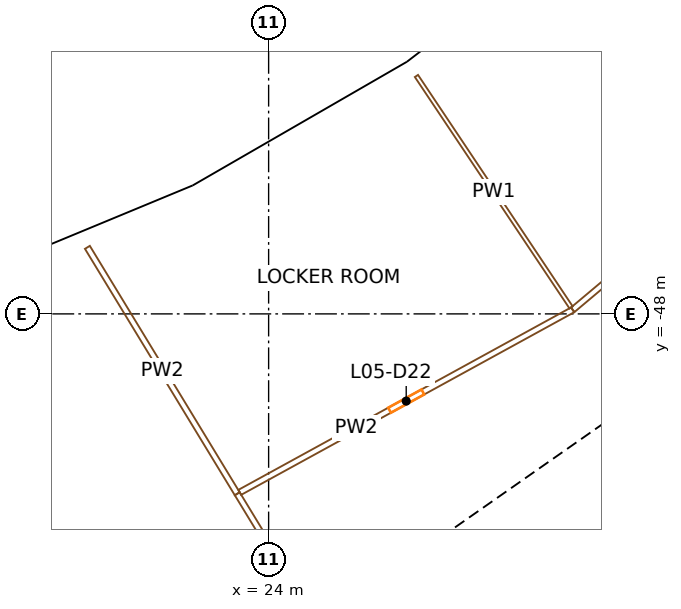
"""IFC4 building model, lengths in metres.
Left out: names, types, materials, properties, quantities, classifications, styles, units other than length and angle.
Written with IfcOpenShell. Run it as: python <this file> out.ifc"""

import sys

from ifc_helpers import new_model, si_unit, direction, frame, frame_2d, origin, origin_2d, place, context, subcontext, project, spatial, rectangle, extrude, element, fill, save


model = new_model("IFC4")
c1 = context("Model", 3, precision=1e-05, world=origin(), true_north=direction((0.0, 1.0)))
c2 = subcontext(c1, "Body", "Model", "MODEL_VIEW")
j1 = project(units=[si_unit("LENGTHUNIT", "METRE"), si_unit("PLANEANGLEUNIT", "RADIAN")], contexts=[c1])
p1 = place(None, origin())
s1 = spatial("IfcSite", under=j1, at=p1, CompositionType="ELEMENT")
p2 = place(p1, origin())
s2 = spatial("IfcBuilding", under=s1, at=p2, CompositionType="ELEMENT")
p3 = place(p2, frame((0.0, 0.0, 36.0)))
s3 = spatial("IfcBuildingStorey", under=s2, at=p3, CompositionType="ELEMENT", Elevation=36.0)
p4 = place(p3, frame((22.446, -45.516, 0.0), z_axis=(0.0, 0.0, 1.0), x_axis=(0.896872741533, 0.442288690219, 0.0)))
e1 = element("IfcColumn", 1, at=p4, inside=s3, PredefinedType="COLUMN", context=c2, shape_type="SweptSolid", body=[
    extrude(rectangle(XDim=1.1, YDim=1.3, at=origin_2d()), origin(), (0.0, 0.0, 1.0), 4.5),
])
p5 = place(p3, frame((25.763, -52.243, 0.0), z_axis=(0.0, 0.0, 1.0), x_axis=(0.896872741533, 0.442288690219, 0.0)))
e2 = element("IfcColumn", 2, at=p5, inside=s3, PredefinedType="COLUMN", context=c2, shape_type="SweptSolid", body=[
    extrude(rectangle(XDim=1.4, YDim=1.8, at=origin_2d()), origin(), (0.0, 0.0, 1.0), 4.5),
])
p6 = place(p3, frame((28.195, -42.197, 0.0), z_axis=(0.0, 0.0, 1.0), x_axis=(0.831469612303, 0.55557023302, 0.0)))
e3 = element("IfcColumn", 3, at=p6, inside=s3, PredefinedType="COLUMN", context=c2, shape_type="SweptSolid", body=[
    extrude(rectangle(XDim=1.1, YDim=1.3, at=origin_2d()), origin(), (0.0, 0.0, 1.0), 4.5),
])
p7 = place(p3, frame((32.362, -48.433, 0.0), z_axis=(0.0, 0.0, 1.0), x_axis=(0.831469612303, 0.55557023302, 0.0)))
e4 = element("IfcColumn", 4, at=p7, inside=s3, PredefinedType="COLUMN", context=c2, shape_type="SweptSolid", body=[
    extrude(rectangle(XDim=1.4, YDim=1.8, at=origin_2d()), origin(), (0.0, 0.0, 1.0), 4.5),
])
p8 = place(p3, frame((28.854, -54.324, 0.0), z_axis=(0.0, 0.0, 1.0), x_axis=(0.819145767589, 0.573585400304, 0.0)))
e5 = element("IfcWall", 5, at=p8, inside=s3, PredefinedType="SHEAR", context=c2, shape_type="SweptSolid", body=[
    extrude(rectangle(XDim=15.045, YDim=0.9, at=frame_2d((7.523, 0.0))), origin(), (0.0, 0.0, 1.0), 4.2),
])
p9 = place(p8, frame((1.05, 0.0, 0.0)))
e6 = element("IfcOpeningElement", 6, at=p9, cuts=e5, PredefinedType="OPENING", context=c2, shape_type="SweptSolid", body=[
    extrude(rectangle(XDim=0.9, YDim=2.1, at=frame_2d((0.45, 1.05))), frame((0.0, 0.46, 0.0), z_axis=(0.0, -1.0, 0.0), x_axis=(1.0, 0.0, 0.0)), (0.0, 0.0, 1.0), 0.92),
])
p10 = place(p8, frame((3.775, 0.0, 0.0)))
e7 = element("IfcOpeningElement", 7, at=p10, cuts=e5, PredefinedType="OPENING", context=c2, shape_type="SweptSolid", body=[
    extrude(rectangle(XDim=1.0, YDim=2.1, at=frame_2d((0.5, 1.05))), frame((0.0, 0.46, 0.0), z_axis=(0.0, -1.0, 0.0), x_axis=(1.0, 0.0, 0.0)), (0.0, 0.0, 1.0), 0.92),
])
p11 = place(p8, frame((6.275, 0.0, 0.0)))
e8 = element("IfcOpeningElement", 8, at=p11, cuts=e5, PredefinedType="OPENING", context=c2, shape_type="SweptSolid", body=[
    extrude(rectangle(XDim=1.0, YDim=2.1, at=frame_2d((0.5, 1.05))), frame((0.0, 0.46, 0.0), z_axis=(0.0, -1.0, 0.0), x_axis=(1.0, 0.0, 0.0)), (0.0, 0.0, 1.0), 0.92),
])
p12 = place(p8, frame((13.495, 0.0, 0.0)))
e9 = element("IfcOpeningElement", 9, at=p12, cuts=e5, PredefinedType="OPENING", context=c2, shape_type="SweptSolid", body=[
    extrude(rectangle(XDim=1.1, YDim=2.1, at=frame_2d((0.55, 1.05))), frame((0.0, 0.46, 0.0), z_axis=(0.0, -1.0, 0.0), x_axis=(1.0, 0.0, 0.0)), (0.0, 0.0, 1.0), 0.92),
])
p13 = place(p3, frame((30.461, -56.618, 0.0), z_axis=(0.0, 0.0, 1.0), x_axis=(0.819142461705, 0.573590121456, 0.0)))
e10 = element("IfcWall", 10, at=p13, inside=s3, PredefinedType="SOLIDWALL", context=c2, shape_type="SweptSolid", body=[
    extrude(rectangle(XDim=7.95, YDim=0.3, at=frame_2d((3.975, 0.0))), origin(), (0.0, 0.0, 1.0), 4.2),
])
p14 = place(p3, frame((32.914, -54.717, 0.0), z_axis=(0.0, 0.0, 1.0), x_axis=(-0.573581496053, 0.819148501424, 0.0)))
e11 = element("IfcWall", 11, at=p14, inside=s3, PredefinedType="PARTITIONING", context=c2, shape_type="SweptSolid", body=[
    extrude(rectangle(XDim=2.2, YDim=0.15, at=frame_2d((1.1, 0.0))), origin(), (0.0, 0.0, 1.0), 4.2),
])
p15 = place(p3, frame((22.131, -44.81, 0.0), z_axis=(0.0, 0.0, 1.0), x_axis=(-0.923877459804, -0.382688436284, 0.0)))
e12 = element("IfcWall", 12, at=p15, inside=s3, PredefinedType="SOLIDWALL", context=c2, shape_type="SweptSolid", body=[
    extrude(rectangle(XDim=6.597, YDim=0.45, at=frame_2d((3.299, 0.0))), origin(), (0.0, 0.0, 1.0), 3.2),
])
p16 = place(p15, frame((3.749, 0.0, 0.9)))
e13 = element("IfcOpeningElement", 13, at=p16, cuts=e12, PredefinedType="OPENING", context=c2, shape_type="SweptSolid", body=[
    extrude(rectangle(XDim=1.2, YDim=2.15, at=frame_2d((0.6, 1.075))), frame((0.0, 0.235, 0.0), z_axis=(0.0, -1.0, 0.0), x_axis=(1.0, 0.0, 0.0)), (0.0, 0.0, 1.0), 0.47),
])
p17 = place(p15, frame((1.648, 0.0, 0.9)))
e14 = element("IfcOpeningElement", 14, at=p17, cuts=e12, PredefinedType="OPENING", context=c2, shape_type="SweptSolid", body=[
    extrude(rectangle(XDim=1.2, YDim=2.15, at=frame_2d((0.6, 1.075))), frame((0.0, 0.235, 0.0), z_axis=(0.0, -1.0, 0.0), x_axis=(1.0, 0.0, 0.0)), (0.0, 0.0, 1.0), 0.47),
])
p18 = place(p3, frame((27.714, -41.583, 0.0), z_axis=(0.0, 0.0, 1.0), x_axis=(-0.866022817921, -0.50000447882, 0.0)))
e15 = element("IfcWall", 15, at=p18, inside=s3, PredefinedType="SOLIDWALL", context=c2, shape_type="SweptSolid", body=[
    extrude(rectangle(XDim=6.419, YDim=0.45, at=frame_2d((3.21, 0.0))), origin(), (0.0, 0.0, 1.0), 3.2),
])
p19 = place(p18, frame((3.66, 0.0, 0.9)))
e16 = element("IfcOpeningElement", 16, at=p19, cuts=e15, PredefinedType="OPENING", context=c2, shape_type="SweptSolid", body=[
    extrude(rectangle(XDim=1.2, YDim=2.15, at=frame_2d((0.6, 1.075))), frame((0.0, 0.235, 0.0), z_axis=(0.0, -1.0, 0.0), x_axis=(1.0, 0.0, 0.0)), (0.0, 0.0, 1.0), 0.47),
])
p20 = place(p18, frame((1.56, 0.0, 0.9)))
e17 = element("IfcOpeningElement", 17, at=p20, cuts=e15, PredefinedType="OPENING", context=c2, shape_type="SweptSolid", body=[
    extrude(rectangle(XDim=1.2, YDim=2.15, at=frame_2d((0.6, 1.075))), frame((0.0, 0.235, 0.0), z_axis=(0.0, -1.0, 0.0), x_axis=(1.0, 0.0, 0.0)), (0.0, 0.0, 1.0), 0.47),
])
p21 = place(p3, frame((32.975, -37.555, 0.0), z_axis=(0.0, 0.0, 1.0), x_axis=(-0.793338838284, -0.608780327927, 0.0)))
e18 = element("IfcWall", 18, at=p21, inside=s3, PredefinedType="SOLIDWALL", context=c2, shape_type="SweptSolid", body=[
    extrude(rectangle(XDim=6.597, YDim=0.45, at=frame_2d((3.298, 0.0))), origin(), (0.0, 0.0, 1.0), 3.2),
])
p22 = place(p21, frame((3.749, 0.0, 0.9)))
e19 = element("IfcOpeningElement", 19, at=p22, cuts=e18, PredefinedType="OPENING", context=c2, shape_type="SweptSolid", body=[
    extrude(rectangle(XDim=1.2, YDim=2.15, at=frame_2d((0.6, 1.075))), frame((0.0, 0.235, 0.0), z_axis=(0.0, -1.0, 0.0), x_axis=(1.0, 0.0, 0.0)), (0.0, 0.0, 1.0), 0.47),
])
p23 = place(p21, frame((1.648, 0.0, 0.9)))
e20 = element("IfcOpeningElement", 20, at=p23, cuts=e18, PredefinedType="OPENING", context=c2, shape_type="SweptSolid", body=[
    extrude(rectangle(XDim=1.2, YDim=2.15, at=frame_2d((0.6, 1.075))), frame((0.0, 0.235, 0.0), z_axis=(0.0, -1.0, 0.0), x_axis=(1.0, 0.0, 0.0)), (0.0, 0.0, 1.0), 0.47),
])
p24 = place(p3, frame((19.231, -46.249, 0.0), z_axis=(0.0, 0.0, 1.0), x_axis=(0.519582509181, -0.854420280748, 0.0)))
e21 = element("IfcWall", 21, at=p24, inside=s3, PredefinedType="PARTITIONING", context=c2, shape_type="SweptSolid", body=[
    extrude(rectangle(XDim=7.588, YDim=0.15, at=frame_2d((3.794, 0.0))), origin(), (0.0, 0.0, 1.0), 3.1),
])
p25 = place(p3, frame((23.174, -52.732, 0.0), z_axis=(0.0, 0.0, 1.0), x_axis=(0.519577254173, -0.854423476355, 0.0)))
e22 = element("IfcWall", 22, at=p25, inside=s3, PredefinedType="PARTITIONING", context=c2, shape_type="SweptSolid", body=[
    extrude(rectangle(XDim=9.345, YDim=0.15, at=frame_2d((4.672, 0.0))), origin(), (0.0, 0.0, 1.0), 3.1),
])
p26 = place(p3, frame((23.24, -52.697, 0.0), z_axis=(0.0, 0.0, 1.0), x_axis=(0.876826033283, 0.480807765492, 0.0)))
e23 = element("IfcWall", 23, at=p26, inside=s3, PredefinedType="PARTITIONING", context=c2, shape_type="SweptSolid", body=[
    extrude(rectangle(XDim=9.991, YDim=0.15, at=frame_2d((4.996, 0.0))), origin(), (0.0, 0.0, 1.0), 3.1),
])
p27 = place(p26, frame((4.496, 0.0, 0.0)))
e24 = element("IfcOpeningElement", 24, at=p27, cuts=e23, PredefinedType="OPENING", context=c2, shape_type="SweptSolid", body=[
    extrude(rectangle(XDim=1.0, YDim=2.1, at=frame_2d((0.5, 1.05))), frame((0.0, 0.085, 0.0), z_axis=(0.0, -1.0, 0.0), x_axis=(1.0, 0.0, 0.0)), (0.0, 0.0, 1.0), 0.17),
])
p28 = place(p3, frame((27.89, -41.74, 0.0), z_axis=(0.0, 0.0, 1.0), x_axis=(0.555569023768, -0.831470420297, 0.0)))
e25 = element("IfcWall", 25, at=p28, inside=s3, PredefinedType="PARTITIONING", context=c2, shape_type="SweptSolid", body=[
    extrude(rectangle(XDim=7.325, YDim=0.1, at=frame_2d((3.663, 0.0))), origin(), (0.0, 0.0, 1.0), 3.1),
])
p29 = place(p3, frame((32.001, -47.893, 0.0), z_axis=(0.0, 0.0, 1.0), x_axis=(0.765734049768, 0.643157340801, 0.0)))
e26 = element("IfcWall", 26, at=p29, inside=s3, PredefinedType="PARTITIONING", context=c2, shape_type="SweptSolid", body=[
    extrude(rectangle(XDim=12.524, YDim=0.15, at=frame_2d((6.262, 0.0))), origin(), (0.0, 0.0, 1.0), 3.1),
])
p30 = place(p29, frame((5.762, 0.0, 0.0)))
e27 = element("IfcOpeningElement", 27, at=p30, cuts=e26, PredefinedType="OPENING", context=c2, shape_type="SweptSolid", body=[
    extrude(rectangle(XDim=1.0, YDim=2.1, at=frame_2d((0.5, 1.05))), frame((0.0, 0.085, 0.0), z_axis=(0.0, -1.0, 0.0), x_axis=(1.0, 0.0, 0.0)), (0.0, 0.0, 1.0), 0.17),
])
p31 = place(p9, origin())
e28 = element("IfcDoor", 28, at=p31, inside=s3, OperationType="SINGLE_SWING_LEFT", PredefinedType="DOOR", context=c2, shape_type="SweptSolid", body=[
    extrude(rectangle(XDim=0.9, YDim=2.1, at=frame_2d((0.45, 1.05))), frame((0.0, 0.025, 0.0), z_axis=(0.0, -1.0, 0.0), x_axis=(1.0, 0.0, 0.0)), (0.0, 0.0, 1.0), 0.05),
])
fill(e6, e28)
p32 = place(p10, origin())
e29 = element("IfcDoor", 29, at=p32, inside=s3, OperationType="SINGLE_SWING_RIGHT", PredefinedType="DOOR", context=c2, shape_type="SweptSolid", body=[
    extrude(rectangle(XDim=1.0, YDim=2.1, at=frame_2d((0.5, 1.05))), frame((0.0, 0.025, 0.0), z_axis=(0.0, -1.0, 0.0), x_axis=(1.0, 0.0, 0.0)), (0.0, 0.0, 1.0), 0.05),
])
fill(e7, e29)
p33 = place(p16, origin())
e30 = element("IfcWindow", 30, at=p33, inside=s3, PartitioningType="SINGLE_PANEL", PredefinedType="WINDOW", context=c2, shape_type="SweptSolid", body=[
    extrude(rectangle(XDim=1.2, YDim=2.15, at=frame_2d((0.6, 1.075))), frame((0.0, 0.03, 0.0), z_axis=(0.0, -1.0, 0.0), x_axis=(1.0, 0.0, 0.0)), (0.0, 0.0, 1.0), 0.06),
])
fill(e13, e30)
p34 = place(p17, origin())
e31 = element("IfcWindow", 31, at=p34, inside=s3, PartitioningType="SINGLE_PANEL", PredefinedType="WINDOW", context=c2, shape_type="SweptSolid", body=[
    extrude(rectangle(XDim=1.2, YDim=2.15, at=frame_2d((0.6, 1.075))), frame((0.0, 0.03, 0.0), z_axis=(0.0, -1.0, 0.0), x_axis=(1.0, 0.0, 0.0)), (0.0, 0.0, 1.0), 0.06),
])
fill(e14, e31)
p35 = place(p19, origin())
e32 = element("IfcWindow", 32, at=p35, inside=s3, PartitioningType="SINGLE_PANEL", PredefinedType="WINDOW", context=c2, shape_type="SweptSolid", body=[
    extrude(rectangle(XDim=1.2, YDim=2.15, at=frame_2d((0.6, 1.075))), frame((0.0, 0.03, 0.0), z_axis=(0.0, -1.0, 0.0), x_axis=(1.0, 0.0, 0.0)), (0.0, 0.0, 1.0), 0.06),
])
fill(e16, e32)
p36 = place(p20, origin())
e33 = element("IfcWindow", 33, at=p36, inside=s3, PartitioningType="SINGLE_PANEL", PredefinedType="WINDOW", context=c2, shape_type="SweptSolid", body=[
    extrude(rectangle(XDim=1.2, YDim=2.15, at=frame_2d((0.6, 1.075))), frame((0.0, 0.03, 0.0), z_axis=(0.0, -1.0, 0.0), x_axis=(1.0, 0.0, 0.0)), (0.0, 0.0, 1.0), 0.06),
])
fill(e17, e33)
p37 = place(p27, origin())
e34 = element("IfcDoor", 34, at=p37, inside=s3, OperationType="SINGLE_SWING_RIGHT", PredefinedType="DOOR", context=c2, shape_type="SweptSolid", body=[
    extrude(rectangle(XDim=1.0, YDim=2.1, at=frame_2d((0.5, 1.05))), frame((0.0, 0.025, 0.0), z_axis=(0.0, -1.0, 0.0), x_axis=(1.0, 0.0, 0.0)), (0.0, 0.0, 1.0), 0.05),
])
fill(e24, e34)
save(model, sys.argv[1])
